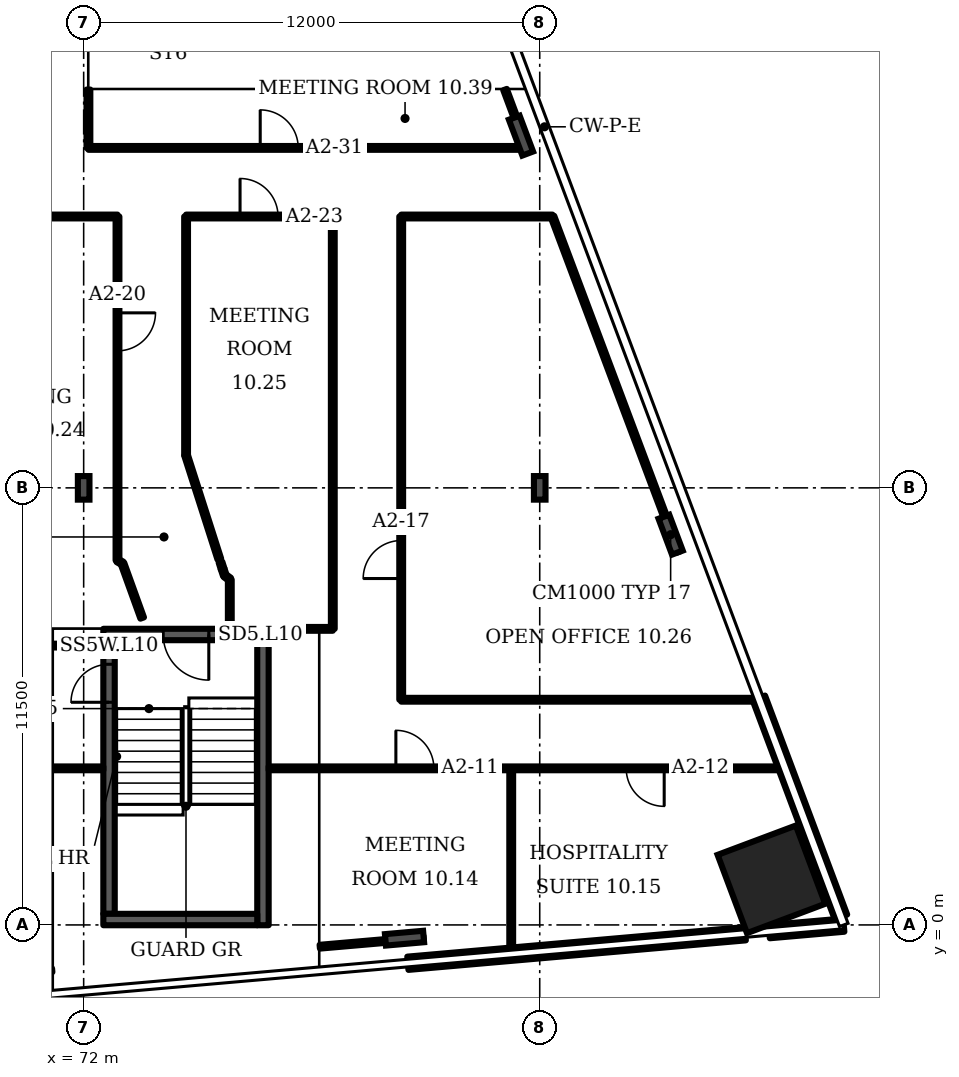
"""IFC4 building model, lengths in metres.
Left out: names, types, materials, properties, quantities, classifications, styles, units other than length and angle.
Written with IfcOpenShell. Run it as: python <this file> out.ifc"""

import sys

from ifc_helpers import new_model, si_unit, direction, frame, frame_2d, origin, origin_2d, place, context, subcontext, project, spatial, rectangle, i_section, extrude, element, fill, save


model = new_model("IFC4")
c1 = context("Model", 3, precision=1e-05, world=origin(), true_north=direction((0.0, 1.0)))
c2 = subcontext(c1, "Body", "Model", "MODEL_VIEW")
j1 = project(units=[si_unit("LENGTHUNIT", "METRE"), si_unit("PLANEANGLEUNIT", "RADIAN")], contexts=[c1])
p1 = place(None, origin())
s1 = spatial("IfcSite", under=j1, at=p1, CompositionType="ELEMENT")
p2 = place(p1, origin())
s2 = spatial("IfcBuilding", under=s1, at=p2, CompositionType="ELEMENT")
p3 = place(p2, frame((0.0, 0.0, 55.9)))
s3 = spatial("IfcBuildingStorey", under=s2, at=p3, CompositionType="ELEMENT", Elevation=55.9)
p4 = place(p3, frame((90.096, 1.2, 0.0), z_axis=(0.0, 0.0, 1.0), x_axis=(-0.351123, 0.936328, 0.0)))
e1 = element("IfcColumn", 1, at=p4, inside=s3, PredefinedType="COLUMN", context=c2, shape_type="SweptSolid", body=[
    extrude(rectangle(XDim=2.2, YDim=2.2, at=origin_2d()), origin(), (0.0, 0.0, 1.0), 3.6),
])
for number, where, z_axis, x_axis in (
    (2, (80.442, -0.349, 0.0), (0.0, 0.0, 1.0), (0.087, -0.996, 0.0)),
    (3, (87.445, 10.268, 0.0), (0.0, 0.0, 1.0), (0.936, 0.351, 0.0)),
    (4, (83.507, 20.768, 0.0), (0.0, 0.0, 1.0), (0.936, 0.351, 0.0)),
):
    element("IfcColumn", number, at=place(p3, frame(where, z_axis=z_axis, x_axis=x_axis)), inside=s3, PredefinedType="COLUMN", context=c2, shape_type="SweptSolid", body=[
        extrude(i_section(OverallWidth=0.302, OverallDepth=1.008, WebThickness=0.021, FlangeThickness=0.04, FilletRadius=0.03, at=origin_2d()), origin(), (0.0, 0.0, 1.0), 3.6),
    ])
for number, where, z_axis, x_axis in (
    (5, (72.0, 11.5, 0.0), (0.0, 0.0, 1.0), (1.0, 0.0, 0.0)),
    (6, (84.0, 11.5, 0.0), (0.0, 0.0, 1.0), (1.0, 0.0, 0.0)),
):
    element("IfcColumn", number, at=place(p3, frame(where, z_axis=z_axis, x_axis=x_axis)), inside=s3, PredefinedType="COLUMN", context=c2, shape_type="SweptSolid", body=[
        extrude(i_section(OverallWidth=0.305, OverallDepth=0.62, WebThickness=0.021, FlangeThickness=0.04, FilletRadius=0.027, at=origin_2d()), origin(), (0.0, 0.0, 1.0), 3.6),
    ])
p5 = place(p3, frame((80.53, -1.009, 0.0), z_axis=(0.0, 0.0, 1.0), x_axis=(0.996198, 0.087169, 0.0)))
e7 = element("IfcWall", 7, at=p5, inside=s3, PredefinedType="SOLIDWALL", context=c2, shape_type="SweptSolid", body=[
    extrude(rectangle(XDim=8.912, YDim=0.35, at=frame_2d((4.456, 0.0))), origin(), (0.0, 0.0, 1.0), 1.0),
])
p6 = place(p3, frame((90.039, -0.177, 0.0), z_axis=(0.0, 0.0, 1.0), x_axis=(0.996193, 0.08717, 0.0)))
e8 = element("IfcWall", 8, at=p6, inside=s3, PredefinedType="SOLIDWALL", context=c2, shape_type="SweptSolid", body=[
    extrude(rectangle(XDim=1.969, YDim=0.35, at=frame_2d((0.984, 0.0))), origin(), (0.0, 0.0, 1.0), 1.0),
])
p7 = place(p3, frame((91.926, 0.211, 0.0), z_axis=(0.0, 0.0, 1.0), x_axis=(-0.351118, 0.936328, 0.0)))
e9 = element("IfcWall", 9, at=p7, inside=s3, PredefinedType="SOLIDWALL", context=c2, shape_type="SweptSolid", body=[
    extrude(rectangle(XDim=6.154, YDim=0.35, at=frame_2d((3.077, 0.0))), origin(), (0.0, 0.0, 1.0), 1.0),
])
p8 = place(p3, frame((72.518, 7.642, 0.0), z_axis=(0.0, 0.0, 1.0), x_axis=(1.0, 0.0, 0.0)))
e10 = element("IfcWall", 10, at=p8, inside=s3, PredefinedType="SHEAR", context=c2, shape_type="SweptSolid", body=[
    extrude(rectangle(XDim=4.35, YDim=0.3, at=frame_2d((2.175, 0.0))), origin(), (0.0, 0.0, 1.0), 3.2),
])
p9 = place(p8, frame((1.575, 0.0, 0.0)))
e11 = element("IfcOpeningElement", 11, at=p9, cuts=e10, PredefinedType="OPENING", context=c2, shape_type="SweptSolid", body=[
    extrude(rectangle(XDim=1.2, YDim=2.1, at=frame_2d((0.6, 1.05))), frame((0.0, 0.16, 0.0), z_axis=(0.0, -1.0, 0.0), x_axis=(1.0, 0.0, 0.0)), (0.0, 0.0, 1.0), 0.32),
])
p10 = place(p3, frame((72.667, 0.292, 0.0), z_axis=(0.0, 0.0, 1.0), x_axis=(0.0, 1.0, 0.0)))
e12 = element("IfcWall", 12, at=p10, inside=s3, PredefinedType="SHEAR", context=c2, shape_type="SweptSolid", body=[
    extrude(rectangle(XDim=7.2, YDim=0.3, at=frame_2d((3.6, 0.0))), origin(), (0.0, 0.0, 1.0), 3.2),
])
p11 = place(p10, frame((5.566, 0.0, 0.0)))
e13 = element("IfcOpeningElement", 13, at=p11, cuts=e12, PredefinedType="OPENING", context=c2, shape_type="SweptSolid", body=[
    extrude(rectangle(XDim=1.0, YDim=2.1, at=frame_2d((0.5, 1.05))), frame((0.0, 0.16, 0.0), z_axis=(0.0, -1.0, 0.0), x_axis=(1.0, 0.0, 0.0)), (0.0, 0.0, 1.0), 0.32),
])
p12 = place(p3, frame((39.55, 18.64, 0.0), z_axis=(0.0, 0.0, 1.0), x_axis=(1.0, 0.0, 0.0)))
e14 = element("IfcWall", 14, at=p12, inside=s3, PredefinedType="PARTITIONING", context=c2, shape_type="SweptSolid", body=[
    extrude(rectangle(XDim=33.34, YDim=0.1, at=frame_2d((16.67, 0.0))), origin(), (0.0, 0.0, 1.0), 3.2),
])
p13 = place(p12, frame((4.645, 0.0, 0.0)))
e15 = element("IfcOpeningElement", 15, at=p13, cuts=e14, PredefinedType="OPENING", context=c2, shape_type="SweptSolid", body=[
    extrude(rectangle(XDim=1.0, YDim=2.1, at=frame_2d((0.5, 1.05))), frame((0.0, 0.06, 0.0), z_axis=(0.0, -1.0, 0.0), x_axis=(1.0, 0.0, 0.0)), (0.0, 0.0, 1.0), 0.12),
])
p14 = place(p3, frame((41.558, 4.12, 0.0), z_axis=(0.0, 0.0, 1.0), x_axis=(1.0, 0.0, 0.0)))
e16 = element("IfcWall", 16, at=p14, inside=s3, PredefinedType="PARTITIONING", context=c2, shape_type="SweptSolid", body=[
    extrude(rectangle(XDim=30.959, YDim=0.1, at=frame_2d((15.479, 0.0))), origin(), (0.0, 0.0, 1.0), 3.2),
])
p15 = place(p14, frame((2.952, 0.0, 0.0)))
e17 = element("IfcOpeningElement", 17, at=p15, cuts=e16, PredefinedType="OPENING", context=c2, shape_type="SweptSolid", body=[
    extrude(rectangle(XDim=1.0, YDim=2.1, at=frame_2d((0.5, 1.05))), frame((0.0, 0.06, 0.0), z_axis=(0.0, -1.0, 0.0), x_axis=(1.0, 0.0, 0.0)), (0.0, 0.0, 1.0), 0.12),
])
p16 = place(p14, frame((7.387, 0.0, 0.0)))
e18 = element("IfcOpeningElement", 18, at=p16, cuts=e16, PredefinedType="OPENING", context=c2, shape_type="SweptSolid", body=[
    extrude(rectangle(XDim=1.0, YDim=2.1, at=frame_2d((0.5, 1.05))), frame((0.0, 0.06, 0.0), z_axis=(0.0, -1.0, 0.0), x_axis=(1.0, 0.0, 0.0)), (0.0, 0.0, 1.0), 0.12),
])
p17 = place(p14, frame((15.417, 0.0, 0.0)))
e19 = element("IfcOpeningElement", 19, at=p17, cuts=e16, PredefinedType="OPENING", context=c2, shape_type="SweptSolid", body=[
    extrude(rectangle(XDim=1.0, YDim=2.1, at=frame_2d((0.5, 1.05))), frame((0.0, 0.06, 0.0), z_axis=(0.0, -1.0, 0.0), x_axis=(1.0, 0.0, 0.0)), (0.0, 0.0, 1.0), 0.12),
])
p18 = place(p14, frame((25.117, 0.0, 0.0)))
e20 = element("IfcOpeningElement", 20, at=p18, cuts=e16, PredefinedType="OPENING", context=c2, shape_type="SweptSolid", body=[
    extrude(rectangle(XDim=1.0, YDim=2.1, at=frame_2d((0.5, 1.05))), frame((0.0, 0.06, 0.0), z_axis=(0.0, -1.0, 0.0), x_axis=(1.0, 0.0, 0.0)), (0.0, 0.0, 1.0), 0.12),
])
p19 = place(p3, frame((68.445, -1.43, 0.0), z_axis=(0.0, 0.0, 1.0), x_axis=(0.996195, 0.087118, 0.0)))
e21 = element("IfcWall", 21, at=p19, inside=s3, PredefinedType="PARTITIONING", context=c2, shape_type="SweptSolid", body=[
    extrude(rectangle(XDim=2.738, YDim=0.1, at=frame_2d((1.369, 0.0))), origin(), (0.0, 0.0, 1.0), 2.58),
])
p20 = place(p3, frame((69.765, 7.35, 0.0), z_axis=(0.0, 0.0, 1.0), x_axis=(1.0, 0.0, 0.0)))
e22 = element("IfcWall", 22, at=p20, inside=s3, PredefinedType="PARTITIONING", context=c2, shape_type="SweptSolid", body=[
    extrude(rectangle(XDim=2.753, YDim=0.1, at=frame_2d((1.376, 0.0))), origin(), (0.0, 0.0, 1.0), 3.2),
])
p21 = place(p3, frame((72.125, 20.445, 0.0), z_axis=(0.0, 0.0, 1.0), x_axis=(0.0, 1.0, 0.0)))
e23 = element("IfcWall", 23, at=p21, inside=s3, PredefinedType="PARTITIONING", context=c2, shape_type="SweptSolid", body=[
    extrude(rectangle(XDim=1.535, YDim=0.1, at=frame_2d((0.768, 0.0))), origin(), (0.0, 0.0, 1.0), 3.2),
])
p22 = place(p3, frame((72.125, 20.445, 0.0), z_axis=(0.0, 0.0, 1.0), x_axis=(1.0, 0.0, 0.0)))
e24 = element("IfcWall", 24, at=p22, inside=s3, PredefinedType="PARTITIONING", context=c2, shape_type="SweptSolid", body=[
    extrude(rectangle(XDim=11.535, YDim=0.1, at=frame_2d((5.768, 0.0))), origin(), (0.0, 0.0, 1.0), 3.2),
])
p23 = place(p22, frame((4.521, 0.0, 0.0)))
e25 = element("IfcOpeningElement", 25, at=p23, cuts=e24, PredefinedType="OPENING", context=c2, shape_type="SweptSolid", body=[
    extrude(rectangle(XDim=1.0, YDim=2.1, at=frame_2d((0.5, 1.05))), frame((0.0, 0.06, 0.0), z_axis=(0.0, -1.0, 0.0), x_axis=(1.0, 0.0, 0.0)), (0.0, 0.0, 1.0), 0.12),
])
p24 = place(p3, frame((72.89, 9.59, 0.0), z_axis=(0.0, 0.0, 1.0), x_axis=(0.0, 1.0, 0.0)))
e26 = element("IfcWall", 26, at=p24, inside=s3, PredefinedType="PARTITIONING", context=c2, shape_type="SweptSolid", body=[
    extrude(rectangle(XDim=9.05, YDim=0.1, at=frame_2d((4.525, 0.0))), origin(), (0.0, 0.0, 1.0), 3.2),
])
p25 = place(p24, frame((5.515, 0.0, 0.0)))
e27 = element("IfcOpeningElement", 27, at=p25, cuts=e26, PredefinedType="OPENING", context=c2, shape_type="SweptSolid", body=[
    extrude(rectangle(XDim=1.0, YDim=2.1, at=frame_2d((0.5, 1.05))), frame((0.0, 0.06, 0.0), z_axis=(0.0, -1.0, 0.0), x_axis=(1.0, 0.0, 0.0)), (0.0, 0.0, 1.0), 0.12),
])
p26 = place(p3, frame((73.02, 9.515, 0.0), z_axis=(0.0, 0.0, 1.0), x_axis=(-0.865836, 0.500333, 0.0)))
e28 = element("IfcWall", 28, at=p26, inside=s3, PredefinedType="PARTITIONING", context=c2, shape_type="SweptSolid", body=[
    extrude(rectangle(XDim=0.15, YDim=0.1, at=frame_2d((0.075, 0.0))), origin(), (0.0, 0.0, 1.0), 3.2),
])
p27 = place(p3, frame((73.54, 8.075, 0.0), z_axis=(0.0, 0.0, 1.0), x_axis=(-0.339669, 0.940548, 0.0)))
e29 = element("IfcWall", 29, at=p27, inside=s3, PredefinedType="PARTITIONING", context=c2, shape_type="SweptSolid", body=[
    extrude(rectangle(XDim=1.531, YDim=0.1, at=frame_2d((0.766, 0.0))), origin(), (0.0, 0.0, 1.0), 3.2),
])
p28 = place(p3, frame((74.695, 12.36, 0.0), z_axis=(0.0, 0.0, 1.0), x_axis=(0.0, 1.0, 0.0)))
e30 = element("IfcWall", 30, at=p28, inside=s3, PredefinedType="PARTITIONING", context=c2, shape_type="SweptSolid", body=[
    extrude(rectangle(XDim=6.28, YDim=0.1, at=frame_2d((3.14, 0.0))), origin(), (0.0, 0.0, 1.0), 3.2),
])
p29 = place(p3, frame((74.695, 18.64, 0.0), z_axis=(0.0, 0.0, 1.0), x_axis=(1.0, 0.0, 0.0)))
e31 = element("IfcWall", 31, at=p29, inside=s3, PredefinedType="PARTITIONING", context=c2, shape_type="SweptSolid", body=[
    extrude(rectangle(XDim=3.86, YDim=0.1, at=frame_2d((1.93, 0.0))), origin(), (0.0, 0.0, 1.0), 3.2),
])
p30 = place(p29, frame((1.42, 0.0, 0.0)))
e32 = element("IfcOpeningElement", 32, at=p30, cuts=e31, PredefinedType="OPENING", context=c2, shape_type="SweptSolid", body=[
    extrude(rectangle(XDim=1.0, YDim=2.1, at=frame_2d((0.5, 1.05))), frame((0.0, 0.06, 0.0), z_axis=(0.0, -1.0, 0.0), x_axis=(1.0, 0.0, 0.0)), (0.0, 0.0, 1.0), 0.12),
])
p31 = place(p3, frame((75.57, 9.625, 0.0), z_axis=(0.0, 0.0, 1.0), x_axis=(-0.305088, 0.952327, 0.0)))
e33 = element("IfcWall", 33, at=p31, inside=s3, PredefinedType="PARTITIONING", context=c2, shape_type="SweptSolid", body=[
    extrude(rectangle(XDim=2.872, YDim=0.1, at=frame_2d((1.436, 0.0))), origin(), (0.0, 0.0, 1.0), 3.2),
])
p32 = place(p3, frame((75.655, 9.37, 0.0), z_axis=(0.0, 0.0, 1.0), x_axis=(-0.299793, 0.954008, 0.0)))
e34 = element("IfcWall", 34, at=p32, inside=s3, PredefinedType="PARTITIONING", context=c2, shape_type="SweptSolid", body=[
    extrude(rectangle(XDim=0.183, YDim=0.1, at=frame_2d((0.092, 0.0))), origin(), (0.0, 0.0, 1.0), 3.2),
])
p33 = place(p3, frame((75.715, 9.19, 0.0), z_axis=(0.0, 0.0, 1.0), x_axis=(-0.316228, 0.948684, 0.0)))
e35 = element("IfcWall", 35, at=p33, inside=s3, PredefinedType="PARTITIONING", context=c2, shape_type="SweptSolid", body=[
    extrude(rectangle(XDim=0.19, YDim=0.1, at=frame_2d((0.095, 0.0))), origin(), (0.0, 0.0, 1.0), 3.2),
])
p34 = place(p3, frame((75.845, 7.812, 0.0), z_axis=(0.0, 0.0, 1.0), x_axis=(0.0, 1.0, 0.0)))
e36 = element("IfcWall", 36, at=p34, inside=s3, PredefinedType="PARTITIONING", context=c2, shape_type="SweptSolid", body=[
    extrude(rectangle(XDim=1.278, YDim=0.1, at=frame_2d((0.639, 0.0))), origin(), (0.0, 0.0, 1.0), 3.2),
])
p35 = place(p3, frame((75.845, 9.095, 0.0), z_axis=(0.0, 0.0, 1.0), x_axis=(-0.807226, 0.590246, 0.0)))
e37 = element("IfcWall", 37, at=p35, inside=s3, PredefinedType="PARTITIONING", context=c2, shape_type="SweptSolid", body=[
    extrude(rectangle(XDim=0.161, YDim=0.1, at=frame_2d((0.081, 0.0))), origin(), (0.0, 0.0, 1.0), 3.2),
])
p36 = place(p3, frame((76.867, 4.12, 0.0), z_axis=(0.0, 0.0, 1.0), x_axis=(1.0, 0.0, 0.0)))
e38 = element("IfcWall", 38, at=p36, inside=s3, PredefinedType="PARTITIONING", context=c2, shape_type="SweptSolid", body=[
    extrude(rectangle(XDim=13.566, YDim=0.1, at=frame_2d((6.783, 0.0))), origin(), (0.0, 0.0, 1.0), 2.58),
])
p37 = place(p36, frame((3.347, 0.0, 0.0)))
e39 = element("IfcOpeningElement", 39, at=p37, cuts=e38, PredefinedType="OPENING", context=c2, shape_type="SweptSolid", body=[
    extrude(rectangle(XDim=1.0, YDim=2.1, at=frame_2d((0.5, 1.05))), frame((0.0, 0.06, 0.0), z_axis=(0.0, -1.0, 0.0), x_axis=(1.0, 0.0, 0.0)), (0.0, 0.0, 1.0), 0.12),
])
p38 = place(p36, frame((9.407, 0.0, 0.0)))
e40 = element("IfcOpeningElement", 40, at=p38, cuts=e38, PredefinedType="OPENING", context=c2, shape_type="SweptSolid", body=[
    extrude(rectangle(XDim=1.0, YDim=2.1, at=frame_2d((0.5, 1.05))), frame((0.0, 0.06, 0.0), z_axis=(0.0, -1.0, 0.0), x_axis=(1.0, 0.0, 0.0)), (0.0, 0.0, 1.0), 0.12),
])
p39 = place(p3, frame((76.867, 7.79, 0.0), z_axis=(0.0, 0.0, 1.0), x_axis=(1.0, 0.0, 0.0)))
e41 = element("IfcWall", 41, at=p39, inside=s3, PredefinedType="PARTITIONING", context=c2, shape_type="SweptSolid", body=[
    extrude(rectangle(XDim=1.688, YDim=0.1, at=frame_2d((0.844, 0.0))), origin(), (0.0, 0.0, 1.0), 3.2),
])
p40 = place(p3, frame((78.212, -0.573, 0.0), z_axis=(0.0, 0.0, 1.0), x_axis=(0.996224, 0.086779, 0.0)))
e42 = element("IfcWall", 42, at=p40, inside=s3, PredefinedType="PARTITIONING", context=c2, shape_type="SweptSolid", body=[
    extrude(rectangle(XDim=2.743, YDim=0.1, at=frame_2d((1.372, 0.0))), origin(), (0.0, 0.0, 1.0), 2.58),
])
p41 = place(p3, frame((78.555, 7.79, 0.0), z_axis=(0.0, 0.0, 1.0), x_axis=(0.0, 1.0, 0.0)))
e43 = element("IfcWall", 43, at=p41, inside=s3, PredefinedType="PARTITIONING", context=c2, shape_type="SweptSolid", body=[
    extrude(rectangle(XDim=10.85, YDim=0.1, at=frame_2d((5.425, 0.0))), origin(), (0.0, 0.0, 1.0), 3.2),
])
p42 = place(p3, frame((80.355, 5.925, 0.0), z_axis=(0.0, 0.0, 1.0), x_axis=(0.0, 1.0, 0.0)))
e44 = element("IfcWall", 44, at=p42, inside=s3, PredefinedType="PARTITIONING", context=c2, shape_type="SweptSolid", body=[
    extrude(rectangle(XDim=12.715, YDim=0.1, at=frame_2d((6.357, 0.0))), origin(), (0.0, 0.0, 1.0), 3.2),
])
p43 = place(p42, frame((3.19, 0.0, 0.0)))
e45 = element("IfcOpeningElement", 45, at=p43, cuts=e44, PredefinedType="OPENING", context=c2, shape_type="SweptSolid", body=[
    extrude(rectangle(XDim=1.0, YDim=2.1, at=frame_2d((0.5, 1.05))), frame((0.0, 0.06, 0.0), z_axis=(0.0, -1.0, 0.0), x_axis=(1.0, 0.0, 0.0)), (0.0, 0.0, 1.0), 0.12),
])
p44 = place(p3, frame((80.355, 5.925, 0.0), z_axis=(0.0, 0.0, 1.0), x_axis=(1.0, 0.0, 0.0)))
e46 = element("IfcWall", 46, at=p44, inside=s3, PredefinedType="PARTITIONING", context=c2, shape_type="SweptSolid", body=[
    extrude(rectangle(XDim=9.402, YDim=0.1, at=frame_2d((4.701, 0.0))), origin(), (0.0, 0.0, 1.0), 2.58),
])
p45 = place(p3, frame((80.355, 18.64, 0.0), z_axis=(0.0, 0.0, 1.0), x_axis=(1.0, 0.0, 0.0)))
e47 = element("IfcWall", 47, at=p45, inside=s3, PredefinedType="PARTITIONING", context=c2, shape_type="SweptSolid", body=[
    extrude(rectangle(XDim=3.98, YDim=0.1, at=frame_2d((1.99, 0.0))), origin(), (0.0, 0.0, 1.0), 3.2),
])
p46 = place(p3, frame((83.25, -0.745, 0.0), z_axis=(0.0, 0.0, 1.0), x_axis=(0.0, 1.0, 0.0)))
e48 = element("IfcWall", 48, at=p46, inside=s3, PredefinedType="PARTITIONING", context=c2, shape_type="SweptSolid", body=[
    extrude(rectangle(XDim=4.865, YDim=0.1, at=frame_2d((2.433, 0.0))), origin(), (0.0, 0.0, 1.0), 2.58),
])
p47 = place(p3, frame((83.66, 20.445, 0.0), z_axis=(0.0, 0.0, 1.0), x_axis=(-0.349474, 0.936948, 0.0)))
e49 = element("IfcWall", 49, at=p47, inside=s3, PredefinedType="PARTITIONING", context=c2, shape_type="SweptSolid", body=[
    extrude(rectangle(XDim=1.638, YDim=0.1, at=frame_2d((0.819, 0.0))), origin(), (0.0, 0.0, 1.0), 2.58),
])
p48 = place(p3, frame((87.65, 9.81, 0.0), z_axis=(0.0, 0.0, 1.0), x_axis=(-0.351473, 0.9362, 0.0)))
e50 = element("IfcWall", 50, at=p48, inside=s3, PredefinedType="PARTITIONING", context=c2, shape_type="SweptSolid", body=[
    extrude(rectangle(XDim=9.432, YDim=0.1, at=frame_2d((4.716, 0.0))), origin(), (0.0, 0.0, 1.0), 2.58),
])
p49 = place(p3, frame((72.817, 7.354, 0.0), z_axis=(0.0, 0.0, 1.0), x_axis=(0.999994, 0.002027, 0.0)))
e51 = element("IfcWall", 51, at=p49, inside=s3, PredefinedType="PARTITIONING", context=c2, shape_type="SweptSolid", body=[
    extrude(rectangle(XDim=0.723, YDim=0.1, at=frame_2d((0.361, 0.0))), origin(), (0.0, 0.0, 1.0), 3.2),
])
p50 = place(p3, frame((76.718, -0.008, 0.0), z_axis=(0.0, 0.0, 1.0), x_axis=(0.0, 1.0, 0.0)))
e52 = element("IfcWall", 52, at=p50, inside=s3, PredefinedType="SHEAR", context=c2, shape_type="SweptSolid", body=[
    extrude(rectangle(XDim=7.5, YDim=0.3, at=frame_2d((3.75, 0.0))), origin(), (0.0, 0.0, 1.0), 3.2),
])
p51 = place(p3, frame((72.518, 0.142, 0.0), z_axis=(0.0, 0.0, 1.0), x_axis=(1.0, 0.0, 0.0)))
e53 = element("IfcWall", 53, at=p51, inside=s3, PredefinedType="SHEAR", context=c2, shape_type="SweptSolid", body=[
    extrude(rectangle(XDim=4.05, YDim=0.3, at=frame_2d((2.025, 0.0))), origin(), (0.0, 0.0, 1.0), 3.2),
])
p52 = place(p11, origin())
e54 = element("IfcDoor", 54, at=p52, inside=s3, OperationType="SINGLE_SWING_LEFT", PredefinedType="DOOR", context=c2, shape_type="SweptSolid", body=[
    extrude(rectangle(XDim=1.0, YDim=2.1, at=frame_2d((0.5, 1.05))), frame((0.0, 0.025, 0.0), z_axis=(0.0, -1.0, 0.0), x_axis=(1.0, 0.0, 0.0)), (0.0, 0.0, 1.0), 0.05),
])
fill(e13, e54)
p53 = place(p9, origin())
e55 = element("IfcDoor", 55, at=p53, inside=s3, OperationType="SINGLE_SWING_RIGHT", PredefinedType="DOOR", context=c2, shape_type="SweptSolid", body=[
    extrude(rectangle(XDim=1.2, YDim=2.1, at=frame_2d((0.6, 1.05))), frame((0.0, 0.025, 0.0), z_axis=(0.0, -1.0, 0.0), x_axis=(1.0, 0.0, 0.0)), (0.0, 0.0, 1.0), 0.05),
])
fill(e11, e55)
p54 = place(p37, origin())
e56 = element("IfcDoor", 56, at=p54, inside=s3, OperationType="SINGLE_SWING_LEFT", PredefinedType="DOOR", context=c2, shape_type="SweptSolid", body=[
    extrude(rectangle(XDim=1.0, YDim=2.1, at=frame_2d((0.5, 1.05))), frame((0.0, 0.025, 0.0), z_axis=(0.0, -1.0, 0.0), x_axis=(1.0, 0.0, 0.0)), (0.0, 0.0, 1.0), 0.05),
])
fill(e39, e56)
p55 = place(p38, origin())
e57 = element("IfcDoor", 57, at=p55, inside=s3, OperationType="SINGLE_SWING_RIGHT", PredefinedType="DOOR", context=c2, shape_type="SweptSolid", body=[
    extrude(rectangle(XDim=1.0, YDim=2.1, at=frame_2d((0.5, 1.05))), frame((0.0, 0.025, 0.0), z_axis=(0.0, -1.0, 0.0), x_axis=(1.0, 0.0, 0.0)), (0.0, 0.0, 1.0), 0.05),
])
fill(e40, e57)
p56 = place(p43, origin())
e58 = element("IfcDoor", 58, at=p56, inside=s3, OperationType="SINGLE_SWING_LEFT", PredefinedType="DOOR", context=c2, shape_type="SweptSolid", body=[
    extrude(rectangle(XDim=1.0, YDim=2.1, at=frame_2d((0.5, 1.05))), frame((0.0, 0.025, 0.0), z_axis=(0.0, -1.0, 0.0), x_axis=(1.0, 0.0, 0.0)), (0.0, 0.0, 1.0), 0.05),
])
fill(e45, e58)
p57 = place(p25, origin())
e59 = element("IfcDoor", 59, at=p57, inside=s3, OperationType="SINGLE_SWING_RIGHT", PredefinedType="DOOR", context=c2, shape_type="SweptSolid", body=[
    extrude(rectangle(XDim=1.0, YDim=2.1, at=frame_2d((0.5, 1.05))), frame((0.0, 0.025, 0.0), z_axis=(0.0, -1.0, 0.0), x_axis=(1.0, 0.0, 0.0)), (0.0, 0.0, 1.0), 0.05),
])
fill(e27, e59)
p58 = place(p30, origin())
e60 = element("IfcDoor", 60, at=p58, inside=s3, OperationType="SINGLE_SWING_LEFT", PredefinedType="DOOR", context=c2, shape_type="SweptSolid", body=[
    extrude(rectangle(XDim=1.0, YDim=2.1, at=frame_2d((0.5, 1.05))), frame((0.0, 0.025, 0.0), z_axis=(0.0, -1.0, 0.0), x_axis=(1.0, 0.0, 0.0)), (0.0, 0.0, 1.0), 0.05),
])
fill(e32, e60)
p59 = place(p23, origin())
e61 = element("IfcDoor", 61, at=p59, inside=s3, OperationType="SINGLE_SWING_LEFT", PredefinedType="DOOR", context=c2, shape_type="SweptSolid", body=[
    extrude(rectangle(XDim=1.0, YDim=2.1, at=frame_2d((0.5, 1.05))), frame((0.0, 0.025, 0.0), z_axis=(0.0, -1.0, 0.0), x_axis=(1.0, 0.0, 0.0)), (0.0, 0.0, 1.0), 0.05),
])
fill(e25, e61)
save(model, sys.argv[1])
